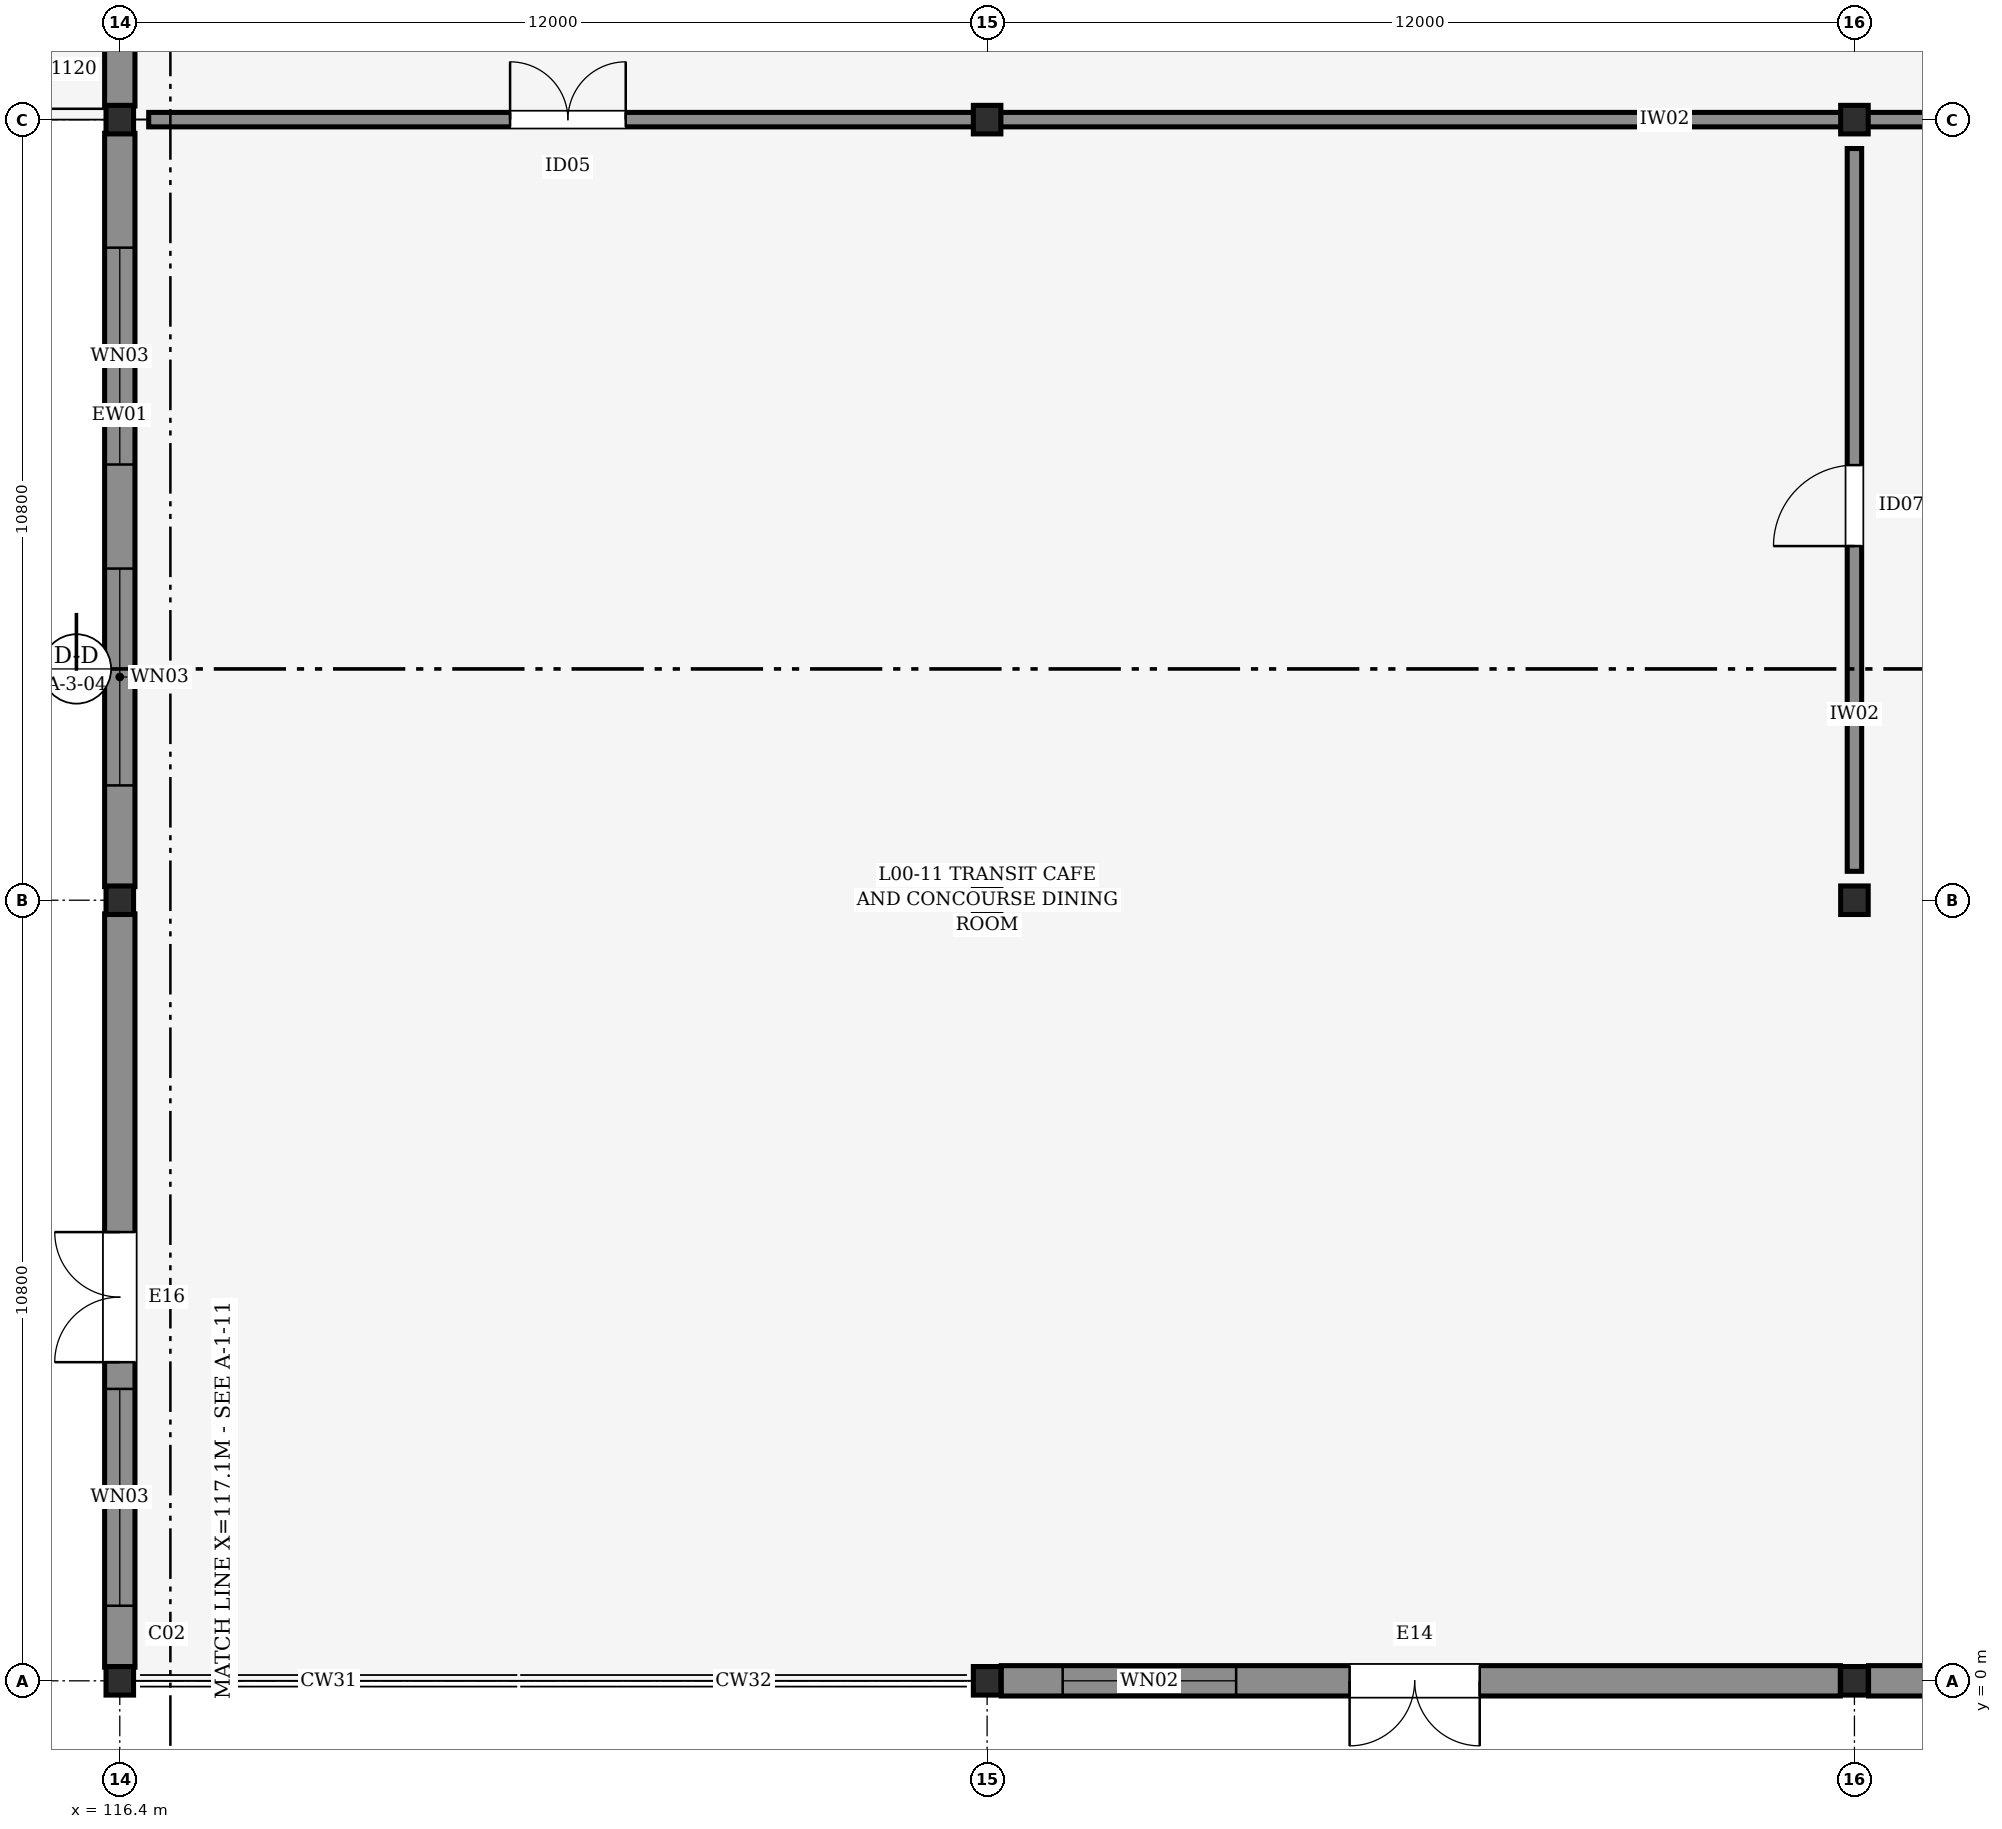
"""IFC4 building model, lengths in metres.
Left out: names, types, materials, properties, quantities, classifications, styles, units other than length and angle.
Written with IfcOpenShell. Run it as: python <this file> out.ifc"""

import sys

from ifc_helpers import new_model, si_unit, direction, frame, frame_2d, origin, origin_2d, place, context, subcontext, project, spatial, rectangle, i_section, extrude, element, fill, save


model = new_model("IFC4")
c1 = context("Model", 3, precision=1e-05, world=origin(), true_north=direction((0.0, 1.0)))
c2 = subcontext(c1, "Body", "Model", "MODEL_VIEW")
j1 = project(units=[si_unit("LENGTHUNIT", "METRE"), si_unit("PLANEANGLEUNIT", "RADIAN")], contexts=[c1])
p1 = place(None, origin())
s1 = spatial("IfcSite", under=j1, at=p1, CompositionType="ELEMENT")
p2 = place(p1, origin())
s2 = spatial("IfcBuilding", under=s1, at=p2, CompositionType="ELEMENT")
p3 = place(p2, origin())
s3 = spatial("IfcBuildingStorey", under=s2, at=p3, CompositionType="ELEMENT", Elevation=0.0)
for number, where, z_axis, x_axis in (
    (1, (116.4, 0.0, 0.0), (0.0, 0.0, 1.0), (1.0, 0.0, 0.0)),
    (2, (116.4, 10.8, 0.0), (0.0, 0.0, 1.0), (1.0, 0.0, 0.0)),
    (3, (116.4, 21.6, 0.0), (0.0, 0.0, 1.0), (1.0, 0.0, 0.0)),
    (4, (128.4, 0.0, 0.0), (0.0, 0.0, 1.0), (1.0, 0.0, 0.0)),
    (5, (128.4, 10.8, 0.0), (0.0, 0.0, 1.0), (1.0, 0.0, 0.0)),
    (6, (128.4, 21.6, 0.0), (0.0, 0.0, 1.0), (1.0, 0.0, 0.0)),
    (7, (140.4, 0.0, 0.0), (0.0, 0.0, 1.0), (1.0, 0.0, 0.0)),
    (8, (140.4, 10.8, 0.0), (0.0, 0.0, 1.0), (1.0, 0.0, 0.0)),
    (9, (140.4, 21.6, 0.0), (0.0, 0.0, 1.0), (1.0, 0.0, 0.0)),
):
    element("IfcColumn", number, at=place(p3, frame(where, z_axis=z_axis, x_axis=x_axis)), inside=s3, PredefinedType="COLUMN", context=c2, shape_type="SweptSolid", body=[
        extrude(i_section(OverallWidth=0.395, OverallDepth=0.381, WebThickness=0.018, FlangeThickness=0.03, FilletRadius=0.015, at=origin_2d()), origin(), (0.0, 0.0, 1.0), 5.4),
    ])
p4 = place(p3, frame((116.4, 0.188, 0.0), z_axis=(0.0, 0.0, 1.0), x_axis=(0.0, 1.0, 0.0)))
e10 = element("IfcWall", 10, at=p4, inside=s3, PredefinedType="STANDARD", context=c2, shape_type="SweptSolid", body=[
    extrude(rectangle(XDim=10.423, YDim=0.42, at=frame_2d((5.211, 0.0))), origin(), (0.0, 0.0, 1.0), 4.335),
])
p5 = place(p4, frame((4.22, 0.0, 0.0)))
e11 = element("IfcOpeningElement", 11, at=p5, cuts=e10, PredefinedType="OPENING", context=c2, shape_type="SweptSolid", body=[
    extrude(rectangle(XDim=1.8, YDim=2.35, at=frame_2d((0.9, 1.175))), frame((0.0, 0.22, 0.0), z_axis=(0.0, -1.0, 0.0), x_axis=(1.0, 0.0, 0.0)), (0.0, 0.0, 1.0), 0.44),
])
p6 = place(p4, frame((0.85, 0.0, 0.75)))
e12 = element("IfcOpeningElement", 12, at=p6, cuts=e10, PredefinedType="OPENING", context=c2, shape_type="SweptSolid", body=[
    extrude(rectangle(XDim=3.0, YDim=2.6, at=frame_2d((1.5, 1.3))), frame((0.0, 0.22, 0.0), z_axis=(0.0, -1.0, 0.0), x_axis=(1.0, 0.0, 0.0)), (0.0, 0.0, 1.0), 0.44),
])
p7 = place(p3, frame((116.4, 10.989, 0.0), z_axis=(0.0, 0.0, 1.0), x_axis=(0.0, 1.0, 0.0)))
e13 = element("IfcWall", 13, at=p7, inside=s3, PredefinedType="STANDARD", context=c2, shape_type="SweptSolid", body=[
    extrude(rectangle(XDim=10.423, YDim=0.42, at=frame_2d((5.211, 0.0))), origin(), (0.0, 0.0, 1.0), 4.335),
])
p8 = place(p7, frame((1.4, 0.0, 0.75)))
e14 = element("IfcOpeningElement", 14, at=p8, cuts=e13, PredefinedType="OPENING", context=c2, shape_type="SweptSolid", body=[
    extrude(rectangle(XDim=3.0, YDim=2.6, at=frame_2d((1.5, 1.3))), frame((0.0, 0.22, 0.0), z_axis=(0.0, -1.0, 0.0), x_axis=(1.0, 0.0, 0.0)), (0.0, 0.0, 1.0), 0.44),
])
p9 = place(p7, frame((5.84, 0.0, 0.75)))
e15 = element("IfcOpeningElement", 15, at=p9, cuts=e13, PredefinedType="OPENING", context=c2, shape_type="SweptSolid", body=[
    extrude(rectangle(XDim=3.0, YDim=2.6, at=frame_2d((1.5, 1.3))), frame((0.0, 0.22, 0.0), z_axis=(0.0, -1.0, 0.0), x_axis=(1.0, 0.0, 0.0)), (0.0, 0.0, 1.0), 0.44),
])
p10 = place(p3, frame((116.4, 21.789, 0.0), z_axis=(0.0, 0.0, 1.0), x_axis=(0.0, 1.0, 0.0)))
e16 = element("IfcWall", 16, at=p10, inside=s3, PredefinedType="STANDARD", context=c2, shape_type="SweptSolid", body=[
    extrude(rectangle(XDim=16.429, YDim=0.42, at=frame_2d((8.215, 0.0))), origin(), (0.0, 0.0, 1.0), 4.335),
])
p11 = place(p10, frame((7.02, 0.0, 0.0)))
e17 = element("IfcOpeningElement", 17, at=p11, cuts=e16, PredefinedType="OPENING", context=c2, shape_type="SweptSolid", body=[
    extrude(rectangle(XDim=2.2, YDim=2.35, at=frame_2d((1.1, 1.175))), frame((0.0, 0.22, 0.0), z_axis=(0.0, -1.0, 0.0), x_axis=(1.0, 0.0, 0.0)), (0.0, 0.0, 1.0), 0.44),
])
p12 = place(p10, frame((0.85, 0.0, 0.75)))
e18 = element("IfcOpeningElement", 18, at=p12, cuts=e16, PredefinedType="OPENING", context=c2, shape_type="SweptSolid", body=[
    extrude(rectangle(XDim=1.8, YDim=2.4, at=frame_2d((0.9, 1.2))), frame((0.0, 0.22, 0.0), z_axis=(0.0, -1.0, 0.0), x_axis=(1.0, 0.0, 0.0)), (0.0, 0.0, 1.0), 0.44),
])
p13 = place(p3, frame((128.595, 0.0, 0.0), z_axis=(0.0, 0.0, 1.0), x_axis=(1.0, 0.0, 0.0)))
e19 = element("IfcWall", 19, at=p13, inside=s3, PredefinedType="STANDARD", context=c2, shape_type="SweptSolid", body=[
    extrude(rectangle(XDim=11.609, YDim=0.42, at=frame_2d((5.805, 0.0))), origin(), (0.0, 0.0, 1.0), 4.335),
])
p14 = place(p13, frame((4.82, 0.0, 0.0)))
e20 = element("IfcOpeningElement", 20, at=p14, cuts=e19, PredefinedType="OPENING", context=c2, shape_type="SweptSolid", body=[
    extrude(rectangle(XDim=1.8, YDim=2.45, at=frame_2d((0.9, 1.225))), frame((0.0, 0.22, 0.0), z_axis=(0.0, -1.0, 0.0), x_axis=(1.0, 0.0, 0.0)), (0.0, 0.0, 1.0), 0.44),
])
p15 = place(p13, frame((0.85, 0.0, 0.75)))
e21 = element("IfcOpeningElement", 21, at=p15, cuts=e19, PredefinedType="OPENING", context=c2, shape_type="SweptSolid", body=[
    extrude(rectangle(XDim=2.4, YDim=2.4, at=frame_2d((1.2, 1.2))), frame((0.0, 0.22, 0.0), z_axis=(0.0, -1.0, 0.0), x_axis=(1.0, 0.0, 0.0)), (0.0, 0.0, 1.0), 0.44),
])
p16 = place(p3, frame((140.595, 0.0, 0.0), z_axis=(0.0, 0.0, 1.0), x_axis=(1.0, 0.0, 0.0)))
e22 = element("IfcWall", 22, at=p16, inside=s3, PredefinedType="STANDARD", context=c2, shape_type="SweptSolid", body=[
    extrude(rectangle(XDim=11.609, YDim=0.42, at=frame_2d((5.805, 0.0))), origin(), (0.0, 0.0, 1.0), 4.335),
])
p17 = place(p16, frame((1.4, 0.0, 0.75)))
e23 = element("IfcOpeningElement", 23, at=p17, cuts=e22, PredefinedType="OPENING", context=c2, shape_type="SweptSolid", body=[
    extrude(rectangle(XDim=1.35, YDim=1.95, at=frame_2d((0.675, 0.975))), frame((0.0, 0.22, 0.0), z_axis=(0.0, -1.0, 0.0), x_axis=(1.0, 0.0, 0.0)), (0.0, 0.0, 1.0), 0.44),
])
p18 = place(p16, frame((8.69, 0.0, 0.75)))
e24 = element("IfcOpeningElement", 24, at=p18, cuts=e22, PredefinedType="OPENING", context=c2, shape_type="SweptSolid", body=[
    extrude(rectangle(XDim=1.35, YDim=1.95, at=frame_2d((0.675, 0.975))), frame((0.0, 0.22, 0.0), z_axis=(0.0, -1.0, 0.0), x_axis=(1.0, 0.0, 0.0)), (0.0, 0.0, 1.0), 0.44),
])
p19 = place(p3, frame((116.8, 21.6, 0.0), z_axis=(0.0, 0.0, 1.0), x_axis=(1.0, 0.0, 0.0)))
e25 = element("IfcWall", 25, at=p19, inside=s3, PredefinedType="PARTITIONING", context=c2, shape_type="SweptSolid", body=[
    extrude(rectangle(XDim=35.2, YDim=0.2, at=frame_2d((17.6, 0.0))), origin(), (0.0, 0.0, 1.0), 4.325),
])
p20 = place(p19, frame((5.0, 0.0, 0.0)))
e26 = element("IfcOpeningElement", 26, at=p20, cuts=e25, PredefinedType="OPENING", context=c2, shape_type="SweptSolid", body=[
    extrude(rectangle(XDim=1.6, YDim=2.25, at=frame_2d((0.8, 1.125))), frame((0.0, 0.11, 0.0), z_axis=(0.0, -1.0, 0.0), x_axis=(1.0, 0.0, 0.0)), (0.0, 0.0, 1.0), 0.22),
])
p21 = place(p3, frame((140.4, 11.2, 0.0), z_axis=(0.0, 0.0, 1.0), x_axis=(0.0, 1.0, 0.0)))
e27 = element("IfcWall", 27, at=p21, inside=s3, PredefinedType="PARTITIONING", context=c2, shape_type="SweptSolid", body=[
    extrude(rectangle(XDim=10.0, YDim=0.2, at=frame_2d((5.0, 0.0))), origin(), (0.0, 0.0, 1.0), 4.325),
])
p22 = place(p21, frame((4.5, 0.0, 0.0)))
e28 = element("IfcOpeningElement", 28, at=p22, cuts=e27, PredefinedType="OPENING", context=c2, shape_type="SweptSolid", body=[
    extrude(rectangle(XDim=1.12, YDim=2.15, at=frame_2d((0.56, 1.075))), frame((0.0, 0.11, 0.0), z_axis=(0.0, -1.0, 0.0), x_axis=(1.0, 0.0, 0.0)), (0.0, 0.0, 1.0), 0.22),
])
p23 = place(p5, origin())
e29 = element("IfcDoor", 29, at=p23, inside=s3, OperationType="DOUBLE_DOOR_SINGLE_SWING", PredefinedType="DOOR", context=c2, shape_type="SweptSolid", body=[
    extrude(rectangle(XDim=1.8, YDim=2.35, at=frame_2d((0.9, 1.175))), frame((0.0, 0.025, 0.0), z_axis=(0.0, -1.0, 0.0), x_axis=(1.0, 0.0, 0.0)), (0.0, 0.0, 1.0), 0.05),
])
fill(e11, e29)
p24 = place(p6, origin())
e30 = element("IfcWindow", 30, at=p24, inside=s3, PartitioningType="SINGLE_PANEL", PredefinedType="WINDOW", context=c2, shape_type="SweptSolid", body=[
    extrude(rectangle(XDim=3.0, YDim=2.6, at=frame_2d((1.5, 1.3))), frame((0.0, 0.03, 0.0), z_axis=(0.0, -1.0, 0.0), x_axis=(1.0, 0.0, 0.0)), (0.0, 0.0, 1.0), 0.06),
])
fill(e12, e30)
p25 = place(p8, origin())
e31 = element("IfcWindow", 31, at=p25, inside=s3, PartitioningType="SINGLE_PANEL", PredefinedType="WINDOW", context=c2, shape_type="SweptSolid", body=[
    extrude(rectangle(XDim=3.0, YDim=2.6, at=frame_2d((1.5, 1.3))), frame((0.0, 0.03, 0.0), z_axis=(0.0, -1.0, 0.0), x_axis=(1.0, 0.0, 0.0)), (0.0, 0.0, 1.0), 0.06),
])
fill(e14, e31)
p26 = place(p9, origin())
e32 = element("IfcWindow", 32, at=p26, inside=s3, PartitioningType="SINGLE_PANEL", PredefinedType="WINDOW", context=c2, shape_type="SweptSolid", body=[
    extrude(rectangle(XDim=3.0, YDim=2.6, at=frame_2d((1.5, 1.3))), frame((0.0, 0.03, 0.0), z_axis=(0.0, -1.0, 0.0), x_axis=(1.0, 0.0, 0.0)), (0.0, 0.0, 1.0), 0.06),
])
fill(e15, e32)
p27 = place(p14, frame((1.8, 0.0, 0.0), z_axis=(0.0, 0.0, 1.0), x_axis=(-1.0, 0.0, 0.0)))
e33 = element("IfcDoor", 33, at=p27, inside=s3, OperationType="DOUBLE_DOOR_SINGLE_SWING", PredefinedType="DOOR", context=c2, shape_type="SweptSolid", body=[
    extrude(rectangle(XDim=1.8, YDim=2.45, at=frame_2d((0.9, 1.225))), frame((0.0, 0.025, 0.0), z_axis=(0.0, -1.0, 0.0), x_axis=(1.0, 0.0, 0.0)), (0.0, 0.0, 1.0), 0.05),
])
fill(e20, e33)
p28 = place(p15, origin())
e34 = element("IfcWindow", 34, at=p28, inside=s3, PartitioningType="SINGLE_PANEL", PredefinedType="WINDOW", context=c2, shape_type="SweptSolid", body=[
    extrude(rectangle(XDim=2.4, YDim=2.4, at=frame_2d((1.2, 1.2))), frame((0.0, 0.03, 0.0), z_axis=(0.0, -1.0, 0.0), x_axis=(1.0, 0.0, 0.0)), (0.0, 0.0, 1.0), 0.06),
])
fill(e21, e34)
p29 = place(p20, origin())
e35 = element("IfcDoor", 35, at=p29, inside=s3, OperationType="DOUBLE_DOOR_SINGLE_SWING", PredefinedType="DOOR", context=c2, shape_type="SweptSolid", body=[
    extrude(rectangle(XDim=1.6, YDim=2.25, at=frame_2d((0.8, 1.125))), frame((0.0, 0.025, 0.0), z_axis=(0.0, -1.0, 0.0), x_axis=(1.0, 0.0, 0.0)), (0.0, 0.0, 1.0), 0.05),
])
fill(e26, e35)
p30 = place(p22, origin())
e36 = element("IfcDoor", 36, at=p30, inside=s3, OperationType="SINGLE_SWING_LEFT", PredefinedType="DOOR", context=c2, shape_type="SweptSolid", body=[
    extrude(rectangle(XDim=1.12, YDim=2.15, at=frame_2d((0.56, 1.075))), frame((0.0, 0.025, 0.0), z_axis=(0.0, -1.0, 0.0), x_axis=(1.0, 0.0, 0.0)), (0.0, 0.0, 1.0), 0.05),
])
fill(e28, e36)
save(model, sys.argv[1])
